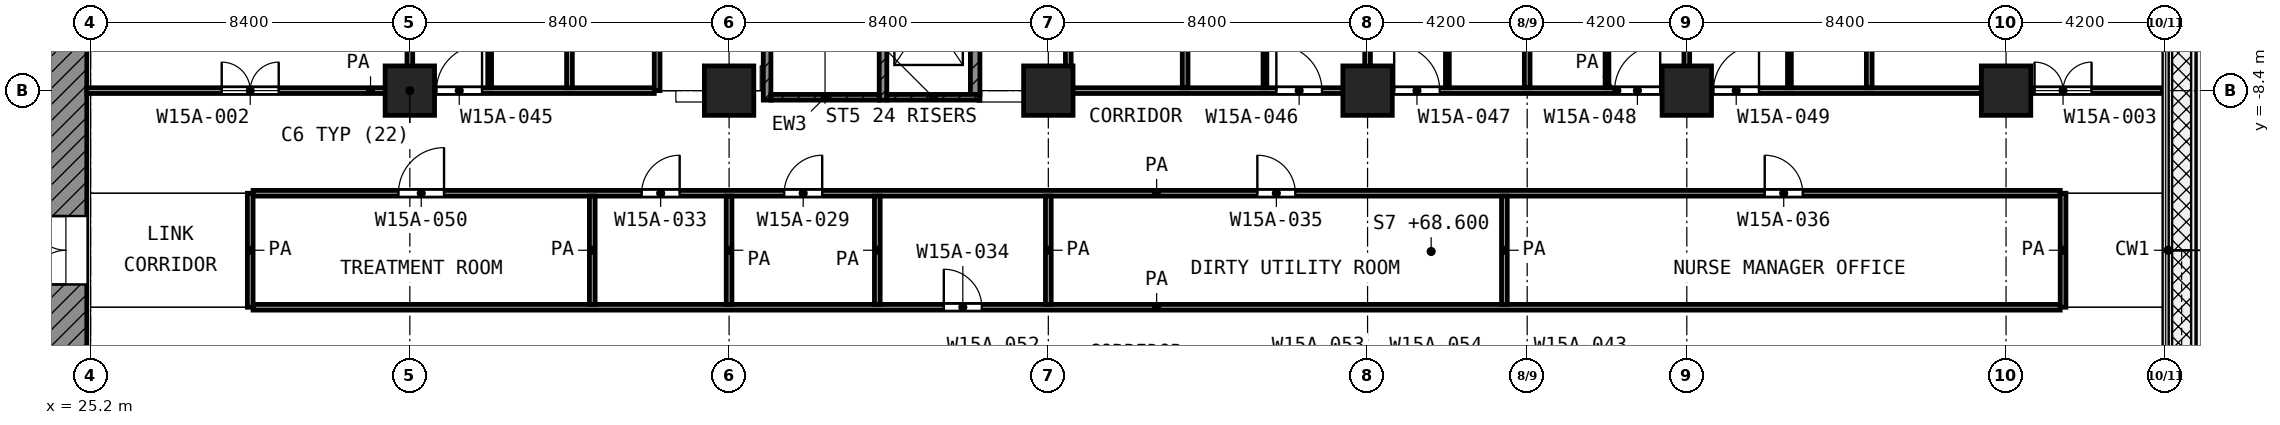
"""IFC4 building model, lengths in metres.
Left out: names, types, materials, properties, quantities, classifications, styles, units other than length and angle.
Written with IfcOpenShell. Run it as: python <this file> out.ifc"""

import sys

from ifc_helpers import new_model, si_unit, direction, frame, frame_2d, origin, origin_2d, place, context, subcontext, project, spatial, rectangle, extrude, element, fill, save


model = new_model("IFC4")
c1 = context("Model", 3, precision=1e-05, world=origin(), true_north=direction((0.0, 1.0)))
c2 = subcontext(c1, "Body", "Model", "MODEL_VIEW")
j1 = project(units=[si_unit("LENGTHUNIT", "METRE"), si_unit("PLANEANGLEUNIT", "RADIAN")], contexts=[c1])
p1 = place(None, origin())
s1 = spatial("IfcSite", under=j1, at=p1, CompositionType="ELEMENT")
p2 = place(p1, origin())
s2 = spatial("IfcBuilding", under=s1, at=p2, CompositionType="ELEMENT")
p3 = place(p2, frame((0.0, 0.0, 68.6)))
s3 = spatial("IfcBuildingStorey", under=s2, at=p3, CompositionType="ELEMENT", Elevation=68.6)
for number, where, z_axis, x_axis in (
    (1, (33.6, -8.4, 0.0), (0.0, 0.0, 1.0), (1.0, 0.0, 0.0)),
    (2, (42.0, -8.4, 0.0), (0.0, 0.0, 1.0), (1.0, 0.0, 0.0)),
    (3, (50.4, -8.4, 0.0), (0.0, 0.0, 1.0), (1.0, 0.0, 0.0)),
    (4, (58.8, -8.4, 0.0), (0.0, 0.0, 1.0), (1.0, 0.0, 0.0)),
    (5, (67.2, -8.4, 0.0), (0.0, 0.0, 1.0), (1.0, 0.0, 0.0)),
    (6, (75.6, -8.4, 0.0), (0.0, 0.0, 1.0), (1.0, 0.0, 0.0)),
):
    element("IfcColumn", number, at=place(p3, frame(where, z_axis=z_axis, x_axis=x_axis)), inside=s3, PredefinedType="COLUMN", context=c2, shape_type="SweptSolid", body=[
        extrude(rectangle(XDim=1.3, YDim=1.3, at=origin_2d()), origin(), (0.0, 0.0, 1.0), 4.2),
    ])
p4 = place(p3, frame((24.55, -24.0, 0.0), z_axis=(0.0, 0.0, 1.0), x_axis=(0.0, 1.0, 0.0)))
e7 = element("IfcWall", 7, at=p4, inside=s3, PredefinedType="SHEAR", context=c2, shape_type="SweptSolid", body=[
    extrude(rectangle(XDim=18.6, YDim=1.1, at=frame_2d((9.3, 0.0))), origin(), (0.0, 0.0, 1.0), 3.9),
])
p5 = place(p4, frame((10.5, 0.0, 0.0)))
e8 = element("IfcOpeningElement", 8, at=p5, cuts=e7, PredefinedType="OPENING", context=c2, shape_type="SweptSolid", body=[
    extrude(rectangle(XDim=1.8, YDim=2.1, at=frame_2d((0.9, 1.05))), frame((0.0, 0.56, 0.0), z_axis=(0.0, -1.0, 0.0), x_axis=(1.0, 0.0, 0.0)), (0.0, 0.0, 1.0), 1.12),
])
p6 = place(p3, frame((43.0, -8.65, 0.0), z_axis=(0.0, 0.0, 1.0), x_axis=(0.0, 1.0, 0.0)))
e9 = element("IfcWall", 9, at=p6, inside=s3, PredefinedType="SHEAR", context=c2, shape_type="SweptSolid", body=[
    extrude(rectangle(XDim=8.35, YDim=0.2, at=frame_2d((4.175, 0.0))), origin(), (0.0, 0.0, 1.0), 3.9),
])
p7 = place(p6, frame((7.0, 0.0, 0.0)))
e10 = element("IfcOpeningElement", 10, at=p7, cuts=e9, PredefinedType="OPENING", context=c2, shape_type="SweptSolid", body=[
    extrude(rectangle(XDim=1.1, YDim=2.1, at=frame_2d((0.55, 1.05))), frame((0.0, 0.11, 0.0), z_axis=(0.0, -1.0, 0.0), x_axis=(1.0, 0.0, 0.0)), (0.0, 0.0, 1.0), 0.22),
])
p8 = place(p3, frame((46.05, -8.65, 0.0), z_axis=(0.0, 0.0, 1.0), x_axis=(0.0, 1.0, 0.0)))
e11 = element("IfcWall", 11, at=p8, inside=s3, PredefinedType="SHEAR", context=c2, shape_type="SweptSolid", body=[
    extrude(rectangle(XDim=8.35, YDim=0.2, at=frame_2d((4.175, 0.0))), origin(), (0.0, 0.0, 1.0), 3.9),
])
p9 = place(p8, frame((7.0, 0.0, 0.0)))
e12 = element("IfcOpeningElement", 12, at=p9, cuts=e11, PredefinedType="OPENING", context=c2, shape_type="SweptSolid", body=[
    extrude(rectangle(XDim=1.1, YDim=2.1, at=frame_2d((0.55, 1.05))), frame((0.0, 0.11, 0.0), z_axis=(0.0, -1.0, 0.0), x_axis=(1.0, 0.0, 0.0)), (0.0, 0.0, 1.0), 0.22),
])
p10 = place(p3, frame((43.1, -8.575, 0.0), z_axis=(0.0, 0.0, 1.0), x_axis=(1.0, 0.0, 0.0)))
e13 = element("IfcWall", 13, at=p10, inside=s3, PredefinedType="SHEAR", context=c2, shape_type="SweptSolid", body=[
    extrude(rectangle(XDim=2.85, YDim=0.15, at=frame_2d((1.425, 0.0))), origin(), (0.0, 0.0, 1.0), 3.9),
])
p11 = place(p3, frame((46.15, -8.575, 0.0), z_axis=(0.0, 0.0, 1.0), x_axis=(1.0, 0.0, 0.0)))
e14 = element("IfcWall", 14, at=p11, inside=s3, PredefinedType="SHEAR", context=c2, shape_type="SweptSolid", body=[
    extrude(rectangle(XDim=2.45, YDim=0.15, at=frame_2d((1.225, 0.0))), origin(), (0.0, 0.0, 1.0), 3.9),
])
p12 = place(p3, frame((48.475, -8.5, 0.0), z_axis=(0.0, 0.0, 1.0), x_axis=(0.0, 1.0, 0.0)))
e15 = element("IfcWall", 15, at=p12, inside=s3, PredefinedType="SHEAR", context=c2, shape_type="SweptSolid", body=[
    extrude(rectangle(XDim=3.475, YDim=0.25, at=frame_2d((1.738, 0.0))), origin(), (0.0, 0.0, 1.0), 3.9),
])
for number, where, z_axis, x_axis in (
    (16, (35.7, -8.325, 0.0), (0.0, 0.0, 1.0), (0.0, 1.0, 0.0)),
    (17, (56.1, -8.325, 0.0), (0.0, 0.0, 1.0), (0.0, 1.0, 0.0)),
    (18, (60.9, -8.325, 0.0), (0.0, 0.0, 1.0), (0.0, 1.0, 0.0)),
    (19, (65.1, -8.325, 0.0), (0.0, 0.0, 1.0), (0.0, 1.0, 0.0)),
    (20, (69.9, -8.325, 0.0), (0.0, 0.0, 1.0), (0.0, 1.0, 0.0)),
):
    element("IfcWall", number, at=place(p3, frame(where, z_axis=z_axis, x_axis=x_axis)), inside=s3, PredefinedType="PARTITIONING", context=c2, shape_type="SweptSolid", body=[
        extrude(rectangle(XDim=2.625, YDim=0.1, at=frame_2d((1.312, 0.0))), origin(), (0.0, 0.0, 1.0), 3.9),
    ])
p13 = place(p3, frame((29.475, -14.1, 0.0), z_axis=(0.0, 0.0, 1.0), x_axis=(1.0, 0.0, 0.0)))
e21 = element("IfcWall", 21, at=p13, inside=s3, PredefinedType="PARTITIONING", context=c2, shape_type="SweptSolid", body=[
    extrude(rectangle(XDim=47.55, YDim=0.15, at=frame_2d((23.775, 0.0))), origin(), (0.0, 0.0, 1.0), 3.9),
])
p14 = place(p13, frame((18.175, 0.0, 0.0)))
e22 = element("IfcOpeningElement", 22, at=p14, cuts=e21, PredefinedType="OPENING", context=c2, shape_type="SweptSolid", body=[
    extrude(rectangle(XDim=1.0, YDim=2.1, at=frame_2d((0.5, 1.05))), frame((0.0, 0.085, 0.0), z_axis=(0.0, -1.0, 0.0), x_axis=(1.0, 0.0, 0.0)), (0.0, 0.0, 1.0), 0.17),
])
p15 = place(p3, frame((29.475, -11.1, 0.0), z_axis=(0.0, 0.0, 1.0), x_axis=(1.0, 0.0, 0.0)))
e23 = element("IfcWall", 23, at=p15, inside=s3, PredefinedType="PARTITIONING", context=c2, shape_type="SweptSolid", body=[
    extrude(rectangle(XDim=47.55, YDim=0.15, at=frame_2d((23.775, 0.0))), origin(), (0.0, 0.0, 1.0), 3.9),
])
p16 = place(p15, frame((3.825, 0.0, 0.0)))
e24 = element("IfcOpeningElement", 24, at=p16, cuts=e23, PredefinedType="OPENING", context=c2, shape_type="SweptSolid", body=[
    extrude(rectangle(XDim=1.2, YDim=2.1, at=frame_2d((0.6, 1.05))), frame((0.0, 0.085, 0.0), z_axis=(0.0, -1.0, 0.0), x_axis=(1.0, 0.0, 0.0)), (0.0, 0.0, 1.0), 0.17),
])
p17 = place(p15, frame((10.225, 0.0, 0.0)))
e25 = element("IfcOpeningElement", 25, at=p17, cuts=e23, PredefinedType="OPENING", context=c2, shape_type="SweptSolid", body=[
    extrude(rectangle(XDim=1.0, YDim=2.1, at=frame_2d((0.5, 1.05))), frame((0.0, 0.085, 0.0), z_axis=(0.0, -1.0, 0.0), x_axis=(1.0, 0.0, 0.0)), (0.0, 0.0, 1.0), 0.17),
])
p18 = place(p15, frame((13.975, 0.0, 0.0)))
e26 = element("IfcOpeningElement", 26, at=p18, cuts=e23, PredefinedType="OPENING", context=c2, shape_type="SweptSolid", body=[
    extrude(rectangle(XDim=1.0, YDim=2.1, at=frame_2d((0.5, 1.05))), frame((0.0, 0.085, 0.0), z_axis=(0.0, -1.0, 0.0), x_axis=(1.0, 0.0, 0.0)), (0.0, 0.0, 1.0), 0.17),
])
p19 = place(p15, frame((26.425, 0.0, 0.0)))
e27 = element("IfcOpeningElement", 27, at=p19, cuts=e23, PredefinedType="OPENING", context=c2, shape_type="SweptSolid", body=[
    extrude(rectangle(XDim=1.0, YDim=2.1, at=frame_2d((0.5, 1.05))), frame((0.0, 0.085, 0.0), z_axis=(0.0, -1.0, 0.0), x_axis=(1.0, 0.0, 0.0)), (0.0, 0.0, 1.0), 0.17),
])
p20 = place(p15, frame((39.775, 0.0, 0.0)))
e28 = element("IfcOpeningElement", 28, at=p20, cuts=e23, PredefinedType="OPENING", context=c2, shape_type="SweptSolid", body=[
    extrude(rectangle(XDim=1.0, YDim=2.1, at=frame_2d((0.5, 1.05))), frame((0.0, 0.085, 0.0), z_axis=(0.0, -1.0, 0.0), x_axis=(1.0, 0.0, 0.0)), (0.0, 0.0, 1.0), 0.17),
])
p21 = place(p3, frame((25.1, -8.4, 0.0), z_axis=(0.0, 0.0, 1.0), x_axis=(1.0, 0.0, 0.0)))
e29 = element("IfcWall", 29, at=p21, inside=s3, PredefinedType="PARTITIONING", context=c2, shape_type="SweptSolid", body=[
    extrude(rectangle(XDim=14.932, YDim=0.15, at=frame_2d((7.466, 0.0))), origin(), (0.0, 0.0, 1.0), 3.9),
])
p22 = place(p21, frame((3.55, 0.0, 0.0)))
e30 = element("IfcOpeningElement", 30, at=p22, cuts=e29, PredefinedType="OPENING", context=c2, shape_type="SweptSolid", body=[
    extrude(rectangle(XDim=1.5, YDim=2.1, at=frame_2d((0.75, 1.05))), frame((0.0, 0.085, 0.0), z_axis=(0.0, -1.0, 0.0), x_axis=(1.0, 0.0, 0.0)), (0.0, 0.0, 1.0), 0.17),
])
p23 = place(p21, frame((9.2, 0.0, 0.0)))
e31 = element("IfcOpeningElement", 31, at=p23, cuts=e29, PredefinedType="OPENING", context=c2, shape_type="SweptSolid", body=[
    extrude(rectangle(XDim=1.2, YDim=2.1, at=frame_2d((0.6, 1.05))), frame((0.0, 0.085, 0.0), z_axis=(0.0, -1.0, 0.0), x_axis=(1.0, 0.0, 0.0)), (0.0, 0.0, 1.0), 0.17),
])
p24 = place(p3, frame((51.0, -8.4, 0.0), z_axis=(0.0, 0.0, 1.0), x_axis=(1.0, 0.0, 0.0)))
e32 = element("IfcWall", 32, at=p24, inside=s3, PredefinedType="PARTITIONING", context=c2, shape_type="SweptSolid", body=[
    extrude(rectangle(XDim=28.72, YDim=0.15, at=frame_2d((14.36, 0.0))), origin(), (0.0, 0.0, 1.0), 3.9),
])
p25 = place(p24, frame((5.4, 0.0, 0.0)))
e33 = element("IfcOpeningElement", 33, at=p25, cuts=e32, PredefinedType="OPENING", context=c2, shape_type="SweptSolid", body=[
    extrude(rectangle(XDim=1.2, YDim=2.1, at=frame_2d((0.6, 1.05))), frame((0.0, 0.085, 0.0), z_axis=(0.0, -1.0, 0.0), x_axis=(1.0, 0.0, 0.0)), (0.0, 0.0, 1.0), 0.17),
])
p26 = place(p24, frame((8.5, 0.0, 0.0)))
e34 = element("IfcOpeningElement", 34, at=p26, cuts=e32, PredefinedType="OPENING", context=c2, shape_type="SweptSolid", body=[
    extrude(rectangle(XDim=1.2, YDim=2.1, at=frame_2d((0.6, 1.05))), frame((0.0, 0.085, 0.0), z_axis=(0.0, -1.0, 0.0), x_axis=(1.0, 0.0, 0.0)), (0.0, 0.0, 1.0), 0.17),
])
p27 = place(p24, frame((14.3, 0.0, 0.0)))
e35 = element("IfcOpeningElement", 35, at=p27, cuts=e32, PredefinedType="OPENING", context=c2, shape_type="SweptSolid", body=[
    extrude(rectangle(XDim=1.2, YDim=2.1, at=frame_2d((0.6, 1.05))), frame((0.0, 0.085, 0.0), z_axis=(0.0, -1.0, 0.0), x_axis=(1.0, 0.0, 0.0)), (0.0, 0.0, 1.0), 0.17),
])
p28 = place(p24, frame((16.9, 0.0, 0.0)))
e36 = element("IfcOpeningElement", 36, at=p28, cuts=e32, PredefinedType="OPENING", context=c2, shape_type="SweptSolid", body=[
    extrude(rectangle(XDim=1.2, YDim=2.1, at=frame_2d((0.6, 1.05))), frame((0.0, 0.085, 0.0), z_axis=(0.0, -1.0, 0.0), x_axis=(1.0, 0.0, 0.0)), (0.0, 0.0, 1.0), 0.17),
])
p29 = place(p24, frame((25.35, 0.0, 0.0)))
e37 = element("IfcOpeningElement", 37, at=p29, cuts=e32, PredefinedType="OPENING", context=c2, shape_type="SweptSolid", body=[
    extrude(rectangle(XDim=1.5, YDim=2.1, at=frame_2d((0.75, 1.05))), frame((0.0, 0.085, 0.0), z_axis=(0.0, -1.0, 0.0), x_axis=(1.0, 0.0, 0.0)), (0.0, 0.0, 1.0), 0.17),
])
p30 = place(p3, frame((29.4, -14.1, 0.0), z_axis=(0.0, 0.0, 1.0), x_axis=(0.0, 1.0, 0.0)))
e38 = element("IfcWall", 38, at=p30, inside=s3, PredefinedType="PARTITIONING", context=c2, shape_type="SweptSolid", body=[
    extrude(rectangle(XDim=3.0, YDim=0.15, at=frame_2d((1.5, 0.0))), origin(), (0.0, 0.0, 1.0), 3.9),
])
for number, where, z_axis, x_axis in (
    (39, (33.6, -8.325, 0.0), (0.0, 0.0, 1.0), (0.0, 1.0, 0.0)),
    (40, (37.8, -8.325, 0.0), (0.0, 0.0, 1.0), (0.0, 1.0, 0.0)),
):
    element("IfcWall", number, at=place(p3, frame(where, z_axis=z_axis, x_axis=x_axis)), inside=s3, PredefinedType="PARTITIONING", context=c2, shape_type="SweptSolid", body=[
        extrude(rectangle(XDim=8.245, YDim=0.15, at=frame_2d((4.123, 0.0))), origin(), (0.0, 0.0, 1.0), 3.9),
    ])
p31 = place(p3, frame((38.4, -14.025, 0.0), z_axis=(0.0, 0.0, 1.0), x_axis=(0.0, 1.0, 0.0)))
e41 = element("IfcWall", 41, at=p31, inside=s3, PredefinedType="PARTITIONING", context=c2, shape_type="SweptSolid", body=[
    extrude(rectangle(XDim=2.85, YDim=0.15, at=frame_2d((1.425, 0.0))), origin(), (0.0, 0.0, 1.0), 3.9),
])
p32 = place(p3, frame((40.107, -8.4, 0.0), z_axis=(0.0, 0.0, 1.0), x_axis=(0.0, 1.0, 0.0)))
e42 = element("IfcWall", 42, at=p32, inside=s3, PredefinedType="PARTITIONING", context=c2, shape_type="SweptSolid", body=[
    extrude(rectangle(XDim=8.048, YDim=0.15, at=frame_2d((4.024, 0.0))), origin(), (0.0, 0.0, 1.0), 3.9),
])
p33 = place(p32, frame((3.574, 0.0, 0.0)))
e43 = element("IfcOpeningElement", 43, at=p33, cuts=e42, PredefinedType="OPENING", context=c2, shape_type="SweptSolid", body=[
    extrude(rectangle(XDim=0.9, YDim=2.1, at=frame_2d((0.45, 1.05))), frame((0.0, 0.085, 0.0), z_axis=(0.0, -1.0, 0.0), x_axis=(1.0, 0.0, 0.0)), (0.0, 0.0, 1.0), 0.17),
])
for number, where, z_axis, x_axis in (
    (44, (42.0, -14.025, 0.0), (0.0, 0.0, 1.0), (0.0, 1.0, 0.0)),
    (45, (45.9, -14.025, 0.0), (0.0, 0.0, 1.0), (0.0, 1.0, 0.0)),
    (46, (50.4, -14.025, 0.0), (0.0, 0.0, 1.0), (0.0, 1.0, 0.0)),
):
    element("IfcWall", number, at=place(p3, frame(where, z_axis=z_axis, x_axis=x_axis)), inside=s3, PredefinedType="PARTITIONING", context=c2, shape_type="SweptSolid", body=[
        extrude(rectangle(XDim=2.85, YDim=0.15, at=frame_2d((1.425, 0.0))), origin(), (0.0, 0.0, 1.0), 3.9),
    ])
p34 = place(p3, frame((50.925, -8.4, 0.0), z_axis=(0.0, 0.0, 1.0), x_axis=(0.0, 1.0, 0.0)))
e47 = element("IfcWall", 47, at=p34, inside=s3, PredefinedType="PARTITIONING", context=c2, shape_type="SweptSolid", body=[
    extrude(rectangle(XDim=6.548, YDim=0.15, at=frame_2d((3.274, 0.0))), origin(), (0.0, 0.0, 1.0), 3.9),
])
p35 = place(p34, frame((2.774, 0.0, 0.0)))
e48 = element("IfcOpeningElement", 48, at=p35, cuts=e47, PredefinedType="OPENING", context=c2, shape_type="SweptSolid", body=[
    extrude(rectangle(XDim=1.0, YDim=2.1, at=frame_2d((0.5, 1.05))), frame((0.0, 0.085, 0.0), z_axis=(0.0, -1.0, 0.0), x_axis=(1.0, 0.0, 0.0)), (0.0, 0.0, 1.0), 0.17),
])
for number, where, z_axis, x_axis in (
    (49, (54.0, -8.325, 0.0), (0.0, 0.0, 1.0), (0.0, 1.0, 0.0)),
    (50, (58.8, -8.325, 0.0), (0.0, 0.0, 1.0), (0.0, 1.0, 0.0)),
):
    element("IfcWall", number, at=place(p3, frame(where, z_axis=z_axis, x_axis=x_axis)), inside=s3, PredefinedType="PARTITIONING", context=c2, shape_type="SweptSolid", body=[
        extrude(rectangle(XDim=8.245, YDim=0.15, at=frame_2d((4.123, 0.0))), origin(), (0.0, 0.0, 1.0), 3.9),
    ])
p36 = place(p3, frame((62.4, -14.025, 0.0), z_axis=(0.0, 0.0, 1.0), x_axis=(0.0, 1.0, 0.0)))
e51 = element("IfcWall", 51, at=p36, inside=s3, PredefinedType="PARTITIONING", context=c2, shape_type="SweptSolid", body=[
    extrude(rectangle(XDim=2.85, YDim=0.15, at=frame_2d((1.425, 0.0))), origin(), (0.0, 0.0, 1.0), 3.9),
])
for number, where, z_axis, x_axis in (
    (52, (63.0, -8.325, 0.0), (0.0, 0.0, 1.0), (0.0, 1.0, 0.0)),
    (53, (67.2, -8.325, 0.0), (0.0, 0.0, 1.0), (0.0, 1.0, 0.0)),
    (54, (72.0, -8.325, 0.0), (0.0, 0.0, 1.0), (0.0, 1.0, 0.0)),
):
    element("IfcWall", number, at=place(p3, frame(where, z_axis=z_axis, x_axis=x_axis)), inside=s3, PredefinedType="PARTITIONING", context=c2, shape_type="SweptSolid", body=[
        extrude(rectangle(XDim=8.245, YDim=0.15, at=frame_2d((4.123, 0.0))), origin(), (0.0, 0.0, 1.0), 3.9),
    ])
p37 = place(p3, frame((77.1, -14.1, 0.0), z_axis=(0.0, 0.0, 1.0), x_axis=(0.0, 1.0, 0.0)))
e55 = element("IfcWall", 55, at=p37, inside=s3, PredefinedType="PARTITIONING", context=c2, shape_type="SweptSolid", body=[
    extrude(rectangle(XDim=3.0, YDim=0.15, at=frame_2d((1.5, 0.0))), origin(), (0.0, 0.0, 1.0), 3.9),
])
p38 = place(p5, origin())
e56 = element("IfcDoor", 56, at=p38, inside=s3, OperationType="DOUBLE_DOOR_SINGLE_SWING", PredefinedType="DOOR", context=c2, shape_type="SweptSolid", body=[
    extrude(rectangle(XDim=1.8, YDim=2.1, at=frame_2d((0.9, 1.05))), frame((0.0, 0.025, 0.0), z_axis=(0.0, -1.0, 0.0), x_axis=(1.0, 0.0, 0.0)), (0.0, 0.0, 1.0), 0.05),
])
fill(e8, e56)
p39 = place(p22, origin())
e57 = element("IfcDoor", 57, at=p39, inside=s3, OperationType="DOUBLE_DOOR_SINGLE_SWING", PredefinedType="DOOR", context=c2, shape_type="SweptSolid", body=[
    extrude(rectangle(XDim=1.5, YDim=2.1, at=frame_2d((0.75, 1.05))), frame((0.0, 0.025, 0.0), z_axis=(0.0, -1.0, 0.0), x_axis=(1.0, 0.0, 0.0)), (0.0, 0.0, 1.0), 0.05),
])
fill(e30, e57)
p40 = place(p23, origin())
e58 = element("IfcDoor", 58, at=p40, inside=s3, OperationType="SINGLE_SWING_RIGHT", PredefinedType="DOOR", context=c2, shape_type="SweptSolid", body=[
    extrude(rectangle(XDim=1.2, YDim=2.1, at=frame_2d((0.6, 1.05))), frame((0.0, 0.025, 0.0), z_axis=(0.0, -1.0, 0.0), x_axis=(1.0, 0.0, 0.0)), (0.0, 0.0, 1.0), 0.05),
])
fill(e31, e58)
p41 = place(p25, origin())
e59 = element("IfcDoor", 59, at=p41, inside=s3, OperationType="SINGLE_SWING_LEFT", PredefinedType="DOOR", context=c2, shape_type="SweptSolid", body=[
    extrude(rectangle(XDim=1.2, YDim=2.1, at=frame_2d((0.6, 1.05))), frame((0.0, 0.025, 0.0), z_axis=(0.0, -1.0, 0.0), x_axis=(1.0, 0.0, 0.0)), (0.0, 0.0, 1.0), 0.05),
])
fill(e33, e59)
p42 = place(p26, origin())
e60 = element("IfcDoor", 60, at=p42, inside=s3, OperationType="SINGLE_SWING_LEFT", PredefinedType="DOOR", context=c2, shape_type="SweptSolid", body=[
    extrude(rectangle(XDim=1.2, YDim=2.1, at=frame_2d((0.6, 1.05))), frame((0.0, 0.025, 0.0), z_axis=(0.0, -1.0, 0.0), x_axis=(1.0, 0.0, 0.0)), (0.0, 0.0, 1.0), 0.05),
])
fill(e34, e60)
p43 = place(p27, origin())
e61 = element("IfcDoor", 61, at=p43, inside=s3, OperationType="SINGLE_SWING_RIGHT", PredefinedType="DOOR", context=c2, shape_type="SweptSolid", body=[
    extrude(rectangle(XDim=1.2, YDim=2.1, at=frame_2d((0.6, 1.05))), frame((0.0, 0.025, 0.0), z_axis=(0.0, -1.0, 0.0), x_axis=(1.0, 0.0, 0.0)), (0.0, 0.0, 1.0), 0.05),
])
fill(e35, e61)
p44 = place(p28, origin())
e62 = element("IfcDoor", 62, at=p44, inside=s3, OperationType="SINGLE_SWING_RIGHT", PredefinedType="DOOR", context=c2, shape_type="SweptSolid", body=[
    extrude(rectangle(XDim=1.2, YDim=2.1, at=frame_2d((0.6, 1.05))), frame((0.0, 0.025, 0.0), z_axis=(0.0, -1.0, 0.0), x_axis=(1.0, 0.0, 0.0)), (0.0, 0.0, 1.0), 0.05),
])
fill(e36, e62)
p45 = place(p29, origin())
e63 = element("IfcDoor", 63, at=p45, inside=s3, OperationType="DOUBLE_DOOR_SINGLE_SWING", PredefinedType="DOOR", context=c2, shape_type="SweptSolid", body=[
    extrude(rectangle(XDim=1.5, YDim=2.1, at=frame_2d((0.75, 1.05))), frame((0.0, 0.025, 0.0), z_axis=(0.0, -1.0, 0.0), x_axis=(1.0, 0.0, 0.0)), (0.0, 0.0, 1.0), 0.05),
])
fill(e37, e63)
p46 = place(p16, origin())
e64 = element("IfcDoor", 64, at=p46, inside=s3, OperationType="SINGLE_SWING_RIGHT", PredefinedType="DOOR", context=c2, shape_type="SweptSolid", body=[
    extrude(rectangle(XDim=1.2, YDim=2.1, at=frame_2d((0.6, 1.05))), frame((0.0, 0.025, 0.0), z_axis=(0.0, -1.0, 0.0), x_axis=(1.0, 0.0, 0.0)), (0.0, 0.0, 1.0), 0.05),
])
fill(e24, e64)
p47 = place(p17, origin())
e65 = element("IfcDoor", 65, at=p47, inside=s3, OperationType="SINGLE_SWING_RIGHT", PredefinedType="DOOR", context=c2, shape_type="SweptSolid", body=[
    extrude(rectangle(XDim=1.0, YDim=2.1, at=frame_2d((0.5, 1.05))), frame((0.0, 0.025, 0.0), z_axis=(0.0, -1.0, 0.0), x_axis=(1.0, 0.0, 0.0)), (0.0, 0.0, 1.0), 0.05),
])
fill(e25, e65)
p48 = place(p18, origin())
e66 = element("IfcDoor", 66, at=p48, inside=s3, OperationType="SINGLE_SWING_RIGHT", PredefinedType="DOOR", context=c2, shape_type="SweptSolid", body=[
    extrude(rectangle(XDim=1.0, YDim=2.1, at=frame_2d((0.5, 1.05))), frame((0.0, 0.025, 0.0), z_axis=(0.0, -1.0, 0.0), x_axis=(1.0, 0.0, 0.0)), (0.0, 0.0, 1.0), 0.05),
])
fill(e26, e66)
p49 = place(p14, origin())
e67 = element("IfcDoor", 67, at=p49, inside=s3, OperationType="SINGLE_SWING_LEFT", PredefinedType="DOOR", context=c2, shape_type="SweptSolid", body=[
    extrude(rectangle(XDim=1.0, YDim=2.1, at=frame_2d((0.5, 1.05))), frame((0.0, 0.025, 0.0), z_axis=(0.0, -1.0, 0.0), x_axis=(1.0, 0.0, 0.0)), (0.0, 0.0, 1.0), 0.05),
])
fill(e22, e67)
p50 = place(p19, origin())
e68 = element("IfcDoor", 68, at=p50, inside=s3, OperationType="SINGLE_SWING_LEFT", PredefinedType="DOOR", context=c2, shape_type="SweptSolid", body=[
    extrude(rectangle(XDim=1.0, YDim=2.1, at=frame_2d((0.5, 1.05))), frame((0.0, 0.025, 0.0), z_axis=(0.0, -1.0, 0.0), x_axis=(1.0, 0.0, 0.0)), (0.0, 0.0, 1.0), 0.05),
])
fill(e27, e68)
p51 = place(p20, origin())
e69 = element("IfcDoor", 69, at=p51, inside=s3, OperationType="SINGLE_SWING_LEFT", PredefinedType="DOOR", context=c2, shape_type="SweptSolid", body=[
    extrude(rectangle(XDim=1.0, YDim=2.1, at=frame_2d((0.5, 1.05))), frame((0.0, 0.025, 0.0), z_axis=(0.0, -1.0, 0.0), x_axis=(1.0, 0.0, 0.0)), (0.0, 0.0, 1.0), 0.05),
])
fill(e28, e69)
save(model, sys.argv[1])
